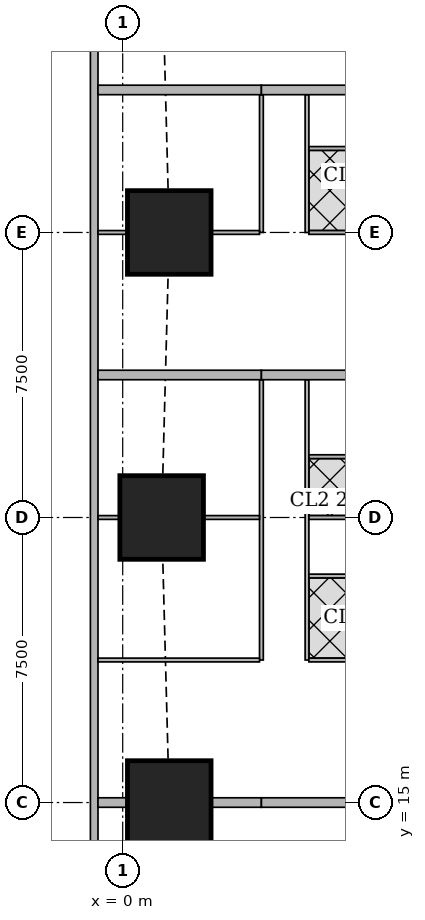
"""IFC4 building model, lengths in metres.
Left out: names, types, materials, properties, quantities, classifications, styles, units other than length and angle.
Written with IfcOpenShell. Run it as: python <this file> out.ifc"""

import sys

from ifc_helpers import new_model, si_unit, direction, frame, frame_2d, origin, origin_2d, place, context, subcontext, project, spatial, rectangle, extrude, element, fill, save


model = new_model("IFC4")
c1 = context("Model", 3, precision=1e-05, world=origin(), true_north=direction((0.0, 1.0)))
c2 = subcontext(c1, "Body", "Model", "MODEL_VIEW")
j1 = project(units=[si_unit("LENGTHUNIT", "METRE"), si_unit("PLANEANGLEUNIT", "RADIAN")], contexts=[c1])
p1 = place(None, origin())
s1 = spatial("IfcSite", under=j1, at=p1, CompositionType="ELEMENT")
p2 = place(p1, origin())
s2 = spatial("IfcBuilding", under=s1, at=p2, CompositionType="ELEMENT")
p3 = place(p2, frame((0.0, 0.0, 100.4)))
s3 = spatial("IfcBuildingStorey", under=s2, at=p3, CompositionType="ELEMENT", Elevation=100.4)
for number, where, z_axis, x_axis in (
    (1, (1.225, 15.0, 0.0), (0.0, 0.0, 1.0), (1.0, 0.0, 0.0)),
    (2, (1.025, 22.5, 0.0), (0.0, 0.0, 1.0), (1.0, 0.0, 0.0)),
    (3, (1.225, 30.0, 0.0), (0.0, 0.0, 1.0), (1.0, 0.0, 0.0)),
):
    element("IfcColumn", number, at=place(p3, frame(where, z_axis=z_axis, x_axis=x_axis)), inside=s3, PredefinedType="COLUMN", context=c2, shape_type="SweptSolid", body=[
        extrude(rectangle(XDim=2.2, YDim=2.2, at=origin_2d()), origin(), (0.0, 0.0, 1.0), 3.75),
    ])
p4 = place(p3, frame((-0.75, 42.837, 0.0), z_axis=(0.0, 0.0, 1.0), x_axis=(0.0, -1.0, 0.0)))
e4 = element("IfcWall", 4, at=p4, inside=s3, PredefinedType="SOLIDWALL", context=c2, shape_type="SweptSolid", body=[
    extrude(rectangle(XDim=40.674, YDim=0.2, at=frame_2d((20.337, 0.0))), origin(), (0.0, 0.0, 1.0), 3.5),
])
p5 = place(p4, frame((1.78, 0.0, 0.9)))
e5 = element("IfcOpeningElement", 5, at=p5, cuts=e4, PredefinedType="OPENING", context=c2, shape_type="SweptSolid", body=[
    extrude(rectangle(XDim=1.8, YDim=1.5, at=frame_2d((0.9, 0.75))), frame((0.0, 0.11, 0.0), z_axis=(0.0, -1.0, 0.0), x_axis=(1.0, 0.0, 0.0)), (0.0, 0.0, 1.0), 0.22),
])
p6 = place(p4, frame((6.312, 0.0, 0.9)))
e6 = element("IfcOpeningElement", 6, at=p6, cuts=e4, PredefinedType="OPENING", context=c2, shape_type="SweptSolid", body=[
    extrude(rectangle(XDim=1.8, YDim=1.5, at=frame_2d((0.9, 0.75))), frame((0.0, 0.11, 0.0), z_axis=(0.0, -1.0, 0.0), x_axis=(1.0, 0.0, 0.0)), (0.0, 0.0, 1.0), 0.22),
])
p7 = place(p4, frame((10.062, 0.0, 0.9)))
e7 = element("IfcOpeningElement", 7, at=p7, cuts=e4, PredefinedType="OPENING", context=c2, shape_type="SweptSolid", body=[
    extrude(rectangle(XDim=1.8, YDim=1.5, at=frame_2d((0.9, 0.75))), frame((0.0, 0.11, 0.0), z_axis=(0.0, -1.0, 0.0), x_axis=(1.0, 0.0, 0.0)), (0.0, 0.0, 1.0), 0.22),
])
p8 = place(p4, frame((13.812, 0.0, 0.9)))
e8 = element("IfcOpeningElement", 8, at=p8, cuts=e4, PredefinedType="OPENING", context=c2, shape_type="SweptSolid", body=[
    extrude(rectangle(XDim=1.8, YDim=1.5, at=frame_2d((0.9, 0.75))), frame((0.0, 0.11, 0.0), z_axis=(0.0, -1.0, 0.0), x_axis=(1.0, 0.0, 0.0)), (0.0, 0.0, 1.0), 0.22),
])
p9 = place(p4, frame((17.562, 0.0, 0.9)))
e9 = element("IfcOpeningElement", 9, at=p9, cuts=e4, PredefinedType="OPENING", context=c2, shape_type="SweptSolid", body=[
    extrude(rectangle(XDim=1.8, YDim=1.5, at=frame_2d((0.9, 0.75))), frame((0.0, 0.11, 0.0), z_axis=(0.0, -1.0, 0.0), x_axis=(1.0, 0.0, 0.0)), (0.0, 0.0, 1.0), 0.22),
])
p10 = place(p4, frame((21.312, 0.0, 0.9)))
e10 = element("IfcOpeningElement", 10, at=p10, cuts=e4, PredefinedType="OPENING", context=c2, shape_type="SweptSolid", body=[
    extrude(rectangle(XDim=1.8, YDim=1.5, at=frame_2d((0.9, 0.75))), frame((0.0, 0.11, 0.0), z_axis=(0.0, -1.0, 0.0), x_axis=(1.0, 0.0, 0.0)), (0.0, 0.0, 1.0), 0.22),
])
p11 = place(p4, frame((25.062, 0.0, 0.9)))
e11 = element("IfcOpeningElement", 11, at=p11, cuts=e4, PredefinedType="OPENING", context=c2, shape_type="SweptSolid", body=[
    extrude(rectangle(XDim=1.8, YDim=1.5, at=frame_2d((0.9, 0.75))), frame((0.0, 0.11, 0.0), z_axis=(0.0, -1.0, 0.0), x_axis=(1.0, 0.0, 0.0)), (0.0, 0.0, 1.0), 0.22),
])
p12 = place(p4, frame((28.812, 0.0, 0.9)))
e12 = element("IfcOpeningElement", 12, at=p12, cuts=e4, PredefinedType="OPENING", context=c2, shape_type="SweptSolid", body=[
    extrude(rectangle(XDim=1.8, YDim=1.5, at=frame_2d((0.9, 0.75))), frame((0.0, 0.11, 0.0), z_axis=(0.0, -1.0, 0.0), x_axis=(1.0, 0.0, 0.0)), (0.0, 0.0, 1.0), 0.22),
])
p13 = place(p4, frame((32.562, 0.0, 0.9)))
e13 = element("IfcOpeningElement", 13, at=p13, cuts=e4, PredefinedType="OPENING", context=c2, shape_type="SweptSolid", body=[
    extrude(rectangle(XDim=1.8, YDim=1.5, at=frame_2d((0.9, 0.75))), frame((0.0, 0.11, 0.0), z_axis=(0.0, -1.0, 0.0), x_axis=(1.0, 0.0, 0.0)), (0.0, 0.0, 1.0), 0.22),
])
p14 = place(p4, frame((37.094, 0.0, 0.9)))
e14 = element("IfcOpeningElement", 14, at=p14, cuts=e4, PredefinedType="OPENING", context=c2, shape_type="SweptSolid", body=[
    extrude(rectangle(XDim=1.8, YDim=1.5, at=frame_2d((0.9, 0.75))), frame((0.0, 0.11, 0.0), z_axis=(0.0, -1.0, 0.0), x_axis=(1.0, 0.0, 0.0)), (0.0, 0.0, 1.0), 0.22),
])
p15 = place(p3, frame((3.65, 18.75, 0.0), z_axis=(0.0, 0.0, 1.0), x_axis=(0.0, 1.0, 0.0)))
e15 = element("IfcWall", 15, at=p15, inside=s3, PredefinedType="PARTITIONING", context=c2, shape_type="SweptSolid", body=[
    extrude(rectangle(XDim=7.375, YDim=0.1, at=frame_2d((3.688, 0.0))), origin(), (0.0, 0.0, 1.0), 3.5),
])
p16 = place(p15, frame((0.2, 0.0, 0.0)))
e16 = element("IfcOpeningElement", 16, at=p16, cuts=e15, PredefinedType="OPENING", context=c2, shape_type="SweptSolid", body=[
    extrude(rectangle(XDim=0.9, YDim=2.1, at=frame_2d((0.45, 1.05))), frame((0.0, 0.06, 0.0), z_axis=(0.0, -1.0, 0.0), x_axis=(1.0, 0.0, 0.0)), (0.0, 0.0, 1.0), 0.12),
])
p17 = place(p15, frame((3.95, 0.0, 0.0)))
e17 = element("IfcOpeningElement", 17, at=p17, cuts=e15, PredefinedType="OPENING", context=c2, shape_type="SweptSolid", body=[
    extrude(rectangle(XDim=0.9, YDim=2.1, at=frame_2d((0.45, 1.05))), frame((0.0, 0.06, 0.0), z_axis=(0.0, -1.0, 0.0), x_axis=(1.0, 0.0, 0.0)), (0.0, 0.0, 1.0), 0.12),
])
p18 = place(p3, frame((4.85, 18.75, 0.0), z_axis=(0.0, 0.0, 1.0), x_axis=(0.0, 1.0, 0.0)))
e18 = element("IfcWall", 18, at=p18, inside=s3, PredefinedType="PARTITIONING", context=c2, shape_type="SweptSolid", body=[
    extrude(rectangle(XDim=7.375, YDim=0.1, at=frame_2d((3.688, 0.0))), origin(), (0.0, 0.0, 1.0), 3.5),
])
p19 = place(p18, frame((0.655, 0.0, 0.0)))
e19 = element("IfcOpeningElement", 19, at=p19, cuts=e18, PredefinedType="OPENING", context=c2, shape_type="SweptSolid", body=[
    extrude(rectangle(XDim=0.9, YDim=2.1, at=frame_2d((0.45, 1.05))), frame((0.0, 0.06, 0.0), z_axis=(0.0, -1.0, 0.0), x_axis=(1.0, 0.0, 0.0)), (0.0, 0.0, 1.0), 0.12),
])
p20 = place(p18, frame((4.1, 0.0, 0.0)))
e20 = element("IfcOpeningElement", 20, at=p20, cuts=e18, PredefinedType="OPENING", context=c2, shape_type="SweptSolid", body=[
    extrude(rectangle(XDim=0.9, YDim=2.1, at=frame_2d((0.45, 1.05))), frame((0.0, 0.06, 0.0), z_axis=(0.0, -1.0, 0.0), x_axis=(1.0, 0.0, 0.0)), (0.0, 0.0, 1.0), 0.12),
])
p21 = place(p18, frame((2.53, 0.0, 0.0)))
e21 = element("IfcOpeningElement", 21, at=p21, cuts=e18, PredefinedType="OPENING", context=c2, shape_type="SweptSolid", body=[
    extrude(rectangle(XDim=0.9, YDim=2.1, at=frame_2d((0.45, 1.05))), frame((0.0, 0.06, 0.0), z_axis=(0.0, -1.0, 0.0), x_axis=(1.0, 0.0, 0.0)), (0.0, 0.0, 1.0), 0.12),
])
p22 = place(p18, frame((5.975, 0.0, 0.0)))
e22 = element("IfcOpeningElement", 22, at=p22, cuts=e18, PredefinedType="OPENING", context=c2, shape_type="SweptSolid", body=[
    extrude(rectangle(XDim=0.9, YDim=2.1, at=frame_2d((0.45, 1.05))), frame((0.0, 0.06, 0.0), z_axis=(0.0, -1.0, 0.0), x_axis=(1.0, 0.0, 0.0)), (0.0, 0.0, 1.0), 0.12),
])
p23 = place(p3, frame((-0.65, 18.75, 0.0), z_axis=(0.0, 0.0, 1.0), x_axis=(1.0, 0.0, 0.0)))
e23 = element("IfcWall", 23, at=p23, inside=s3, PredefinedType="PARTITIONING", context=c2, shape_type="SweptSolid", body=[
    extrude(rectangle(XDim=4.25, YDim=0.1, at=frame_2d((2.125, 0.0))), origin(), (0.0, 0.0, 1.0), 2.2),
])
p24 = place(p3, frame((-0.65, 22.5, 0.0), z_axis=(0.0, 0.0, 1.0), x_axis=(1.0, 0.0, 0.0)))
e24 = element("IfcWall", 24, at=p24, inside=s3, PredefinedType="PARTITIONING", context=c2, shape_type="SweptSolid", body=[
    extrude(rectangle(XDim=0.574, YDim=0.1, at=frame_2d((0.287, 0.0))), origin(), (0.0, 0.0, 1.0), 3.5),
])
p25 = place(p3, frame((2.126, 22.5, 0.0), z_axis=(0.0, 0.0, 1.0), x_axis=(1.0, 0.0, 0.0)))
e25 = element("IfcWall", 25, at=p25, inside=s3, PredefinedType="PARTITIONING", context=c2, shape_type="SweptSolid", body=[
    extrude(rectangle(XDim=1.474, YDim=0.1, at=frame_2d((0.737, 0.0))), origin(), (0.0, 0.0, 1.0), 3.5),
])
p26 = place(p3, frame((4.9, 18.75, 0.0), z_axis=(0.0, 0.0, 1.0), x_axis=(1.0, 0.0, 0.0)))
e26 = element("IfcWall", 26, at=p26, inside=s3, PredefinedType="PARTITIONING", context=c2, shape_type="SweptSolid", body=[
    extrude(rectangle(XDim=3.275, YDim=0.1, at=frame_2d((1.638, 0.0))), origin(), (0.0, 0.0, 1.0), 3.5),
])
p27 = place(p3, frame((4.9, 22.5, 0.0), z_axis=(0.0, 0.0, 1.0), x_axis=(1.0, 0.0, 0.0)))
e27 = element("IfcWall", 27, at=p27, inside=s3, PredefinedType="PARTITIONING", context=c2, shape_type="SweptSolid", body=[
    extrude(rectangle(XDim=1.499, YDim=0.1, at=frame_2d((0.75, 0.0))), origin(), (0.0, 0.0, 1.0), 3.5),
])
for number, where, z_axis, x_axis in (
    (28, (4.9, 20.96, 0.0), (0.0, 0.0, 1.0), (1.0, 0.0, 0.0)),
    (29, (4.9, 24.1, 0.0), (0.0, 0.0, 1.0), (1.0, 0.0, 0.0)),
):
    element("IfcWall", number, at=place(p3, frame(where, z_axis=z_axis, x_axis=x_axis)), inside=s3, PredefinedType="PARTITIONING", context=c2, shape_type="SweptSolid", body=[
        extrude(rectangle(XDim=3.275, YDim=0.1, at=frame_2d((1.638, 0.0))), origin(), (0.0, 0.0, 1.0), 3.5),
    ])
p28 = place(p3, frame((-0.65, 15.0, 0.0), z_axis=(0.0, 0.0, 1.0), x_axis=(1.0, 0.0, 0.0)))
e30 = element("IfcWall", 30, at=p28, inside=s3, PredefinedType="SOLIDWALL", context=c2, shape_type="SweptSolid", body=[
    extrude(rectangle(XDim=0.774, YDim=0.25, at=frame_2d((0.387, 0.0))), origin(), (0.0, 0.0, 1.0), 3.5),
])
p29 = place(p3, frame((2.326, 15.0, 0.0), z_axis=(0.0, 0.0, 1.0), x_axis=(1.0, 0.0, 0.0)))
e31 = element("IfcWall", 31, at=p29, inside=s3, PredefinedType="SOLIDWALL", context=c2, shape_type="SweptSolid", body=[
    extrude(rectangle(XDim=1.324, YDim=0.25, at=frame_2d((0.662, 0.0))), origin(), (0.0, 0.0, 1.0), 3.5),
])
p30 = place(p3, frame((3.65, 15.0, 0.0), z_axis=(0.0, 0.0, 1.0), x_axis=(1.0, 0.0, 0.0)))
e32 = element("IfcWall", 32, at=p30, inside=s3, PredefinedType="SOLIDWALL", context=c2, shape_type="SweptSolid", body=[
    extrude(rectangle(XDim=2.749, YDim=0.25, at=frame_2d((1.375, 0.0))), origin(), (0.0, 0.0, 1.0), 3.5),
])
p31 = place(p3, frame((3.65, 30.0, 0.0), z_axis=(0.0, 0.0, 1.0), x_axis=(0.0, 1.0, 0.0)))
e33 = element("IfcWall", 33, at=p31, inside=s3, PredefinedType="PARTITIONING", context=c2, shape_type="SweptSolid", body=[
    extrude(rectangle(XDim=3.625, YDim=0.1, at=frame_2d((1.812, 0.0))), origin(), (0.0, 0.0, 1.0), 3.5),
])
p32 = place(p31, frame((0.2, 0.0, 0.0)))
e34 = element("IfcOpeningElement", 34, at=p32, cuts=e33, PredefinedType="OPENING", context=c2, shape_type="SweptSolid", body=[
    extrude(rectangle(XDim=0.9, YDim=2.1, at=frame_2d((0.45, 1.05))), frame((0.0, 0.06, 0.0), z_axis=(0.0, -1.0, 0.0), x_axis=(1.0, 0.0, 0.0)), (0.0, 0.0, 1.0), 0.12),
])
p33 = place(p3, frame((4.85, 30.0, 0.0), z_axis=(0.0, 0.0, 1.0), x_axis=(0.0, 1.0, 0.0)))
e35 = element("IfcWall", 35, at=p33, inside=s3, PredefinedType="PARTITIONING", context=c2, shape_type="SweptSolid", body=[
    extrude(rectangle(XDim=3.625, YDim=0.1, at=frame_2d((1.812, 0.0))), origin(), (0.0, 0.0, 1.0), 3.5),
])
p34 = place(p33, frame((0.655, 0.0, 0.0)))
e36 = element("IfcOpeningElement", 36, at=p34, cuts=e35, PredefinedType="OPENING", context=c2, shape_type="SweptSolid", body=[
    extrude(rectangle(XDim=0.9, YDim=2.1, at=frame_2d((0.45, 1.05))), frame((0.0, 0.06, 0.0), z_axis=(0.0, -1.0, 0.0), x_axis=(1.0, 0.0, 0.0)), (0.0, 0.0, 1.0), 0.12),
])
p35 = place(p33, frame((2.53, 0.0, 0.0)))
e37 = element("IfcOpeningElement", 37, at=p35, cuts=e35, PredefinedType="OPENING", context=c2, shape_type="SweptSolid", body=[
    extrude(rectangle(XDim=0.9, YDim=2.1, at=frame_2d((0.45, 1.05))), frame((0.0, 0.06, 0.0), z_axis=(0.0, -1.0, 0.0), x_axis=(1.0, 0.0, 0.0)), (0.0, 0.0, 1.0), 0.12),
])
p36 = place(p3, frame((-0.65, 30.0, 0.0), z_axis=(0.0, 0.0, 1.0), x_axis=(1.0, 0.0, 0.0)))
e38 = element("IfcWall", 38, at=p36, inside=s3, PredefinedType="PARTITIONING", context=c2, shape_type="SweptSolid", body=[
    extrude(rectangle(XDim=0.774, YDim=0.1, at=frame_2d((0.387, 0.0))), origin(), (0.0, 0.0, 1.0), 3.5),
])
p37 = place(p3, frame((2.326, 30.0, 0.0), z_axis=(0.0, 0.0, 1.0), x_axis=(1.0, 0.0, 0.0)))
e39 = element("IfcWall", 39, at=p37, inside=s3, PredefinedType="PARTITIONING", context=c2, shape_type="SweptSolid", body=[
    extrude(rectangle(XDim=1.274, YDim=0.1, at=frame_2d((0.637, 0.0))), origin(), (0.0, 0.0, 1.0), 3.5),
])
p38 = place(p3, frame((4.9, 30.0, 0.0), z_axis=(0.0, 0.0, 1.0), x_axis=(1.0, 0.0, 0.0)))
e40 = element("IfcWall", 40, at=p38, inside=s3, PredefinedType="PARTITIONING", context=c2, shape_type="SweptSolid", body=[
    extrude(rectangle(XDim=1.499, YDim=0.1, at=frame_2d((0.75, 0.0))), origin(), (0.0, 0.0, 1.0), 3.5),
])
p39 = place(p3, frame((4.9, 32.21, 0.0), z_axis=(0.0, 0.0, 1.0), x_axis=(1.0, 0.0, 0.0)))
e41 = element("IfcWall", 41, at=p39, inside=s3, PredefinedType="PARTITIONING", context=c2, shape_type="SweptSolid", body=[
    extrude(rectangle(XDim=3.275, YDim=0.1, at=frame_2d((1.638, 0.0))), origin(), (0.0, 0.0, 1.0), 3.5),
])
p40 = place(p3, frame((-0.65, 26.25, 0.0), z_axis=(0.0, 0.0, 1.0), x_axis=(1.0, 0.0, 0.0)))
e42 = element("IfcWall", 42, at=p40, inside=s3, PredefinedType="SOLIDWALL", context=c2, shape_type="SweptSolid", body=[
    extrude(rectangle(XDim=4.3, YDim=0.25, at=frame_2d((2.15, 0.0))), origin(), (0.0, 0.0, 1.0), 2.2),
])
p41 = place(p3, frame((3.65, 26.25, 0.0), z_axis=(0.0, 0.0, 1.0), x_axis=(1.0, 0.0, 0.0)))
e43 = element("IfcWall", 43, at=p41, inside=s3, PredefinedType="SOLIDWALL", context=c2, shape_type="SweptSolid", body=[
    extrude(rectangle(XDim=4.525, YDim=0.25, at=frame_2d((2.263, 0.0))), origin(), (0.0, 0.0, 1.0), 3.5),
])
p42 = place(p3, frame((-0.65, 33.75, 0.0), z_axis=(0.0, 0.0, 1.0), x_axis=(1.0, 0.0, 0.0)))
e44 = element("IfcWall", 44, at=p42, inside=s3, PredefinedType="SOLIDWALL", context=c2, shape_type="SweptSolid", body=[
    extrude(rectangle(XDim=4.3, YDim=0.25, at=frame_2d((2.15, 0.0))), origin(), (0.0, 0.0, 1.0), 2.2),
])
p43 = place(p3, frame((3.65, 33.75, 0.0), z_axis=(0.0, 0.0, 1.0), x_axis=(1.0, 0.0, 0.0)))
e45 = element("IfcWall", 45, at=p43, inside=s3, PredefinedType="SOLIDWALL", context=c2, shape_type="SweptSolid", body=[
    extrude(rectangle(XDim=4.525, YDim=0.25, at=frame_2d((2.263, 0.0))), origin(), (0.0, 0.0, 1.0), 3.5),
])
p44 = place(p6, origin())
e46 = element("IfcWindow", 46, at=p44, inside=s3, PartitioningType="SINGLE_PANEL", PredefinedType="WINDOW", context=c2, shape_type="SweptSolid", body=[
    extrude(rectangle(XDim=1.8, YDim=1.5, at=frame_2d((0.9, 0.75))), frame((0.0, 0.03, 0.0), z_axis=(0.0, -1.0, 0.0), x_axis=(1.0, 0.0, 0.0)), (0.0, 0.0, 1.0), 0.06),
])
fill(e6, e46)
p45 = place(p7, origin())
e47 = element("IfcWindow", 47, at=p45, inside=s3, PartitioningType="SINGLE_PANEL", PredefinedType="WINDOW", context=c2, shape_type="SweptSolid", body=[
    extrude(rectangle(XDim=1.8, YDim=1.5, at=frame_2d((0.9, 0.75))), frame((0.0, 0.03, 0.0), z_axis=(0.0, -1.0, 0.0), x_axis=(1.0, 0.0, 0.0)), (0.0, 0.0, 1.0), 0.06),
])
fill(e7, e47)
p46 = place(p8, origin())
e48 = element("IfcWindow", 48, at=p46, inside=s3, PartitioningType="SINGLE_PANEL", PredefinedType="WINDOW", context=c2, shape_type="SweptSolid", body=[
    extrude(rectangle(XDim=1.8, YDim=1.5, at=frame_2d((0.9, 0.75))), frame((0.0, 0.03, 0.0), z_axis=(0.0, -1.0, 0.0), x_axis=(1.0, 0.0, 0.0)), (0.0, 0.0, 1.0), 0.06),
])
fill(e8, e48)
p47 = place(p9, origin())
e49 = element("IfcWindow", 49, at=p47, inside=s3, PartitioningType="SINGLE_PANEL", PredefinedType="WINDOW", context=c2, shape_type="SweptSolid", body=[
    extrude(rectangle(XDim=1.8, YDim=1.5, at=frame_2d((0.9, 0.75))), frame((0.0, 0.03, 0.0), z_axis=(0.0, -1.0, 0.0), x_axis=(1.0, 0.0, 0.0)), (0.0, 0.0, 1.0), 0.06),
])
fill(e9, e49)
p48 = place(p10, origin())
e50 = element("IfcWindow", 50, at=p48, inside=s3, PartitioningType="SINGLE_PANEL", PredefinedType="WINDOW", context=c2, shape_type="SweptSolid", body=[
    extrude(rectangle(XDim=1.8, YDim=1.5, at=frame_2d((0.9, 0.75))), frame((0.0, 0.03, 0.0), z_axis=(0.0, -1.0, 0.0), x_axis=(1.0, 0.0, 0.0)), (0.0, 0.0, 1.0), 0.06),
])
fill(e10, e50)
p49 = place(p11, origin())
e51 = element("IfcWindow", 51, at=p49, inside=s3, PartitioningType="SINGLE_PANEL", PredefinedType="WINDOW", context=c2, shape_type="SweptSolid", body=[
    extrude(rectangle(XDim=1.8, YDim=1.5, at=frame_2d((0.9, 0.75))), frame((0.0, 0.03, 0.0), z_axis=(0.0, -1.0, 0.0), x_axis=(1.0, 0.0, 0.0)), (0.0, 0.0, 1.0), 0.06),
])
fill(e11, e51)
p50 = place(p12, origin())
e52 = element("IfcWindow", 52, at=p50, inside=s3, PartitioningType="SINGLE_PANEL", PredefinedType="WINDOW", context=c2, shape_type="SweptSolid", body=[
    extrude(rectangle(XDim=1.8, YDim=1.5, at=frame_2d((0.9, 0.75))), frame((0.0, 0.03, 0.0), z_axis=(0.0, -1.0, 0.0), x_axis=(1.0, 0.0, 0.0)), (0.0, 0.0, 1.0), 0.06),
])
fill(e12, e52)
p51 = place(p16, origin())
e53 = element("IfcDoor", 53, at=p51, inside=s3, OperationType="SINGLE_SWING_LEFT", PredefinedType="DOOR", context=c2, shape_type="SweptSolid", body=[
    extrude(rectangle(XDim=0.9, YDim=2.1, at=frame_2d((0.45, 1.05))), frame((0.0, 0.025, 0.0), z_axis=(0.0, -1.0, 0.0), x_axis=(1.0, 0.0, 0.0)), (0.0, 0.0, 1.0), 0.05),
])
fill(e16, e53)
p52 = place(p17, origin())
e54 = element("IfcDoor", 54, at=p52, inside=s3, OperationType="SINGLE_SWING_LEFT", PredefinedType="DOOR", context=c2, shape_type="SweptSolid", body=[
    extrude(rectangle(XDim=0.9, YDim=2.1, at=frame_2d((0.45, 1.05))), frame((0.0, 0.025, 0.0), z_axis=(0.0, -1.0, 0.0), x_axis=(1.0, 0.0, 0.0)), (0.0, 0.0, 1.0), 0.05),
])
fill(e17, e54)
p53 = place(p19, origin())
e55 = element("IfcDoor", 55, at=p53, inside=s3, OperationType="SINGLE_SWING_RIGHT", PredefinedType="DOOR", context=c2, shape_type="SweptSolid", body=[
    extrude(rectangle(XDim=0.9, YDim=2.1, at=frame_2d((0.45, 1.05))), frame((0.0, 0.025, 0.0), z_axis=(0.0, -1.0, 0.0), x_axis=(1.0, 0.0, 0.0)), (0.0, 0.0, 1.0), 0.05),
])
fill(e19, e55)
p54 = place(p20, origin())
e56 = element("IfcDoor", 56, at=p54, inside=s3, OperationType="SINGLE_SWING_LEFT", PredefinedType="DOOR", context=c2, shape_type="SweptSolid", body=[
    extrude(rectangle(XDim=0.9, YDim=2.1, at=frame_2d((0.45, 1.05))), frame((0.0, 0.025, 0.0), z_axis=(0.0, -1.0, 0.0), x_axis=(1.0, 0.0, 0.0)), (0.0, 0.0, 1.0), 0.05),
])
fill(e20, e56)
p55 = place(p21, origin())
e57 = element("IfcDoor", 57, at=p55, inside=s3, OperationType="SINGLE_SWING_LEFT", PredefinedType="DOOR", context=c2, shape_type="SweptSolid", body=[
    extrude(rectangle(XDim=0.9, YDim=2.1, at=frame_2d((0.45, 1.05))), frame((0.0, 0.025, 0.0), z_axis=(0.0, -1.0, 0.0), x_axis=(1.0, 0.0, 0.0)), (0.0, 0.0, 1.0), 0.05),
])
fill(e21, e57)
p56 = place(p22, origin())
e58 = element("IfcDoor", 58, at=p56, inside=s3, OperationType="SINGLE_SWING_LEFT", PredefinedType="DOOR", context=c2, shape_type="SweptSolid", body=[
    extrude(rectangle(XDim=0.9, YDim=2.1, at=frame_2d((0.45, 1.05))), frame((0.0, 0.025, 0.0), z_axis=(0.0, -1.0, 0.0), x_axis=(1.0, 0.0, 0.0)), (0.0, 0.0, 1.0), 0.05),
])
fill(e22, e58)
p57 = place(p32, origin())
e59 = element("IfcDoor", 59, at=p57, inside=s3, OperationType="SINGLE_SWING_LEFT", PredefinedType="DOOR", context=c2, shape_type="SweptSolid", body=[
    extrude(rectangle(XDim=0.9, YDim=2.1, at=frame_2d((0.45, 1.05))), frame((0.0, 0.025, 0.0), z_axis=(0.0, -1.0, 0.0), x_axis=(1.0, 0.0, 0.0)), (0.0, 0.0, 1.0), 0.05),
])
fill(e34, e59)
p58 = place(p34, origin())
e60 = element("IfcDoor", 60, at=p58, inside=s3, OperationType="SINGLE_SWING_RIGHT", PredefinedType="DOOR", context=c2, shape_type="SweptSolid", body=[
    extrude(rectangle(XDim=0.9, YDim=2.1, at=frame_2d((0.45, 1.05))), frame((0.0, 0.025, 0.0), z_axis=(0.0, -1.0, 0.0), x_axis=(1.0, 0.0, 0.0)), (0.0, 0.0, 1.0), 0.05),
])
fill(e36, e60)
p59 = place(p35, origin())
e61 = element("IfcDoor", 61, at=p59, inside=s3, OperationType="SINGLE_SWING_LEFT", PredefinedType="DOOR", context=c2, shape_type="SweptSolid", body=[
    extrude(rectangle(XDim=0.9, YDim=2.1, at=frame_2d((0.45, 1.05))), frame((0.0, 0.025, 0.0), z_axis=(0.0, -1.0, 0.0), x_axis=(1.0, 0.0, 0.0)), (0.0, 0.0, 1.0), 0.05),
])
fill(e37, e61)
save(model, sys.argv[1])
